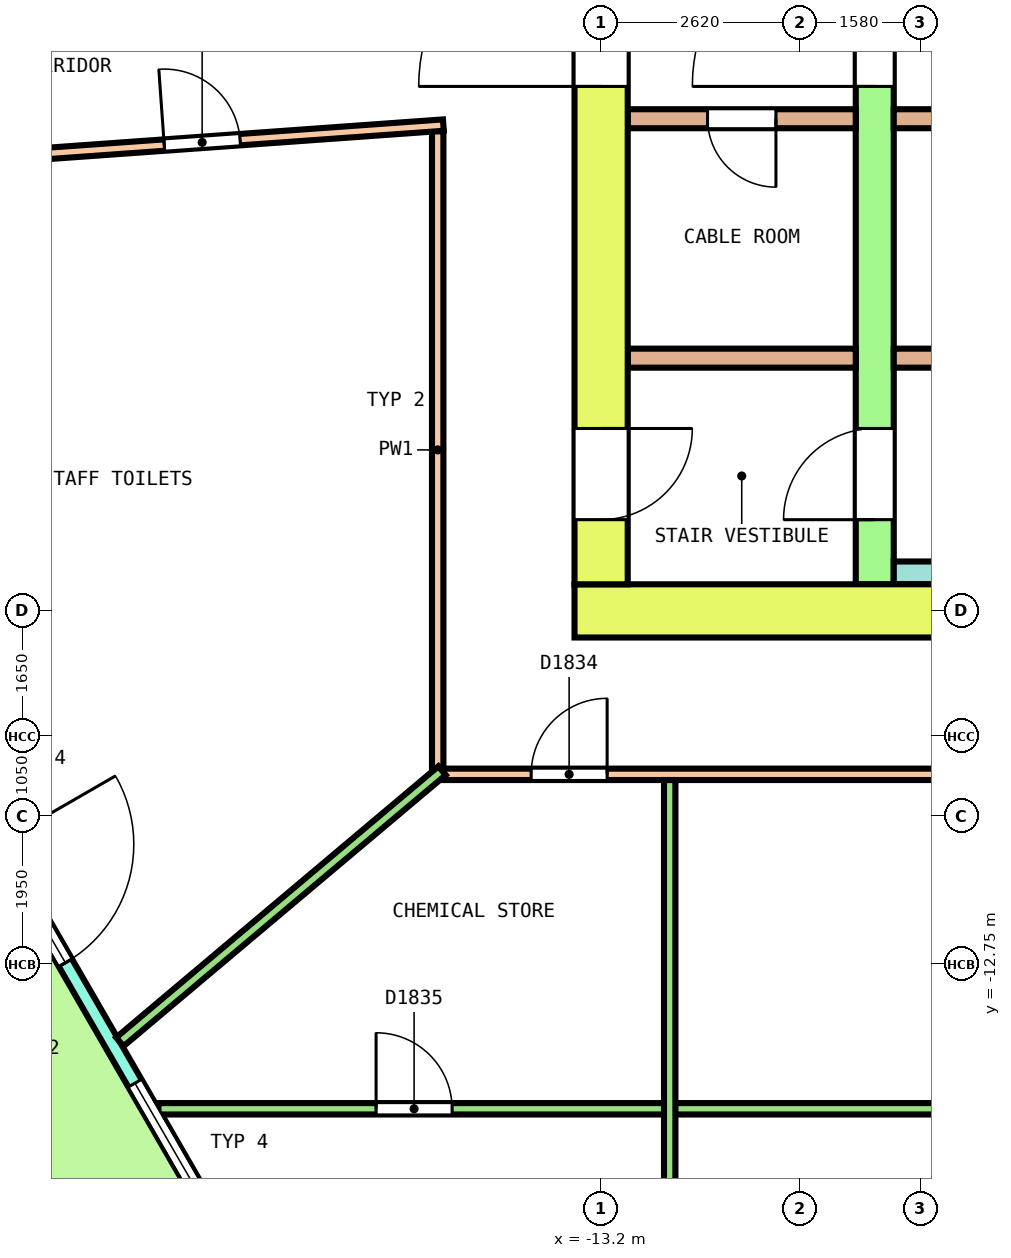
"""IFC4 building model, lengths in metres.
Left out: names, types, materials, properties, quantities, classifications, styles, units other than length and angle.
Written with IfcOpenShell. Run it as: python <this file> out.ifc"""

import sys

from ifc_helpers import new_model, si_unit, direction, frame, frame_2d, origin, place, context, subcontext, project, spatial, polyline, rectangle, outline, extrude, element, fill, save


model = new_model("IFC4")
c1 = context("Model", 3, precision=1e-05, world=origin(), true_north=direction((0.0, 1.0)))
c2 = subcontext(c1, "Body", "Model", "MODEL_VIEW")
j1 = project(units=[si_unit("LENGTHUNIT", "METRE"), si_unit("PLANEANGLEUNIT", "RADIAN")], contexts=[c1])
p1 = place(None, origin())
s1 = spatial("IfcSite", under=j1, at=p1, CompositionType="ELEMENT")
p2 = place(p1, origin())
s2 = spatial("IfcBuilding", under=s1, at=p2, CompositionType="ELEMENT")
p3 = place(p2, frame((0.0, 0.0, 176.0)))
s3 = spatial("IfcBuildingStorey", under=s2, at=p3, CompositionType="ELEMENT", Elevation=176.0)
p4 = place(p3, frame((-26.172, -2.469, 0.0), z_axis=(0.0, 0.0, 1.0), x_axis=(0.500000763912, -0.866024962739, 0.0)))
e1 = element("IfcWall", 1, at=p4, inside=s3, PredefinedType="SOLIDWALL", context=c2, shape_type="SweptSolid", body=[
    extrude(outline(polyline([(-0.027, -0.1), (1.018, -0.1), (2.063, -0.1), (3.109, -0.1), (4.154, -0.1), (5.199, -0.1), (6.244, -0.1), (7.289, -0.1), (8.334, -0.1), (9.38, -0.1), (10.425, -0.1), (11.47, -0.1), (12.515, -0.1), (13.56, -0.1), (14.605, -0.1), (15.65, -0.1), (16.696, -0.1), (17.741, -0.1), (18.786, -0.1), (19.831, -0.1), (20.876, -0.1), (21.921, -0.1), (21.868, 0.1), (20.828, 0.1), (19.788, 0.1), (18.748, 0.1), (17.708, 0.1), (16.667, 0.1), (15.627, 0.1), (14.587, 0.1), (13.547, 0.1), (12.507, 0.1), (11.467, 0.1), (10.427, 0.1), (9.387, 0.1), (8.347, 0.1), (7.307, 0.1), (6.267, 0.1), (5.227, 0.1), (4.187, 0.1), (3.147, 0.1), (2.107, 0.1), (1.067, 0.1), (0.027, 0.1), (-0.027, -0.1)])), origin(), (0.0, 0.0, 1.0), 4.1),
])
p5 = place(p4, frame((0.54, 0.0, 0.1)))
e2 = element("IfcOpeningElement", 2, at=p5, cuts=e1, PredefinedType="OPENING", context=c2, shape_type="SweptSolid", body=[
    extrude(rectangle(XDim=3.3, YDim=2.9, at=frame_2d((1.65, 1.45))), frame((0.0, 0.11, 0.0), z_axis=(0.0, -1.0, 0.0), x_axis=(1.0, 0.0, 0.0)), (0.0, 0.0, 1.0), 0.22),
])
p6 = place(p4, frame((4.918, 0.0, 0.1)))
e3 = element("IfcOpeningElement", 3, at=p6, cuts=e1, PredefinedType="OPENING", context=c2, shape_type="SweptSolid", body=[
    extrude(rectangle(XDim=3.3, YDim=2.9, at=frame_2d((1.65, 1.45))), frame((0.0, 0.11, 0.0), z_axis=(0.0, -1.0, 0.0), x_axis=(1.0, 0.0, 0.0)), (0.0, 0.0, 1.0), 0.22),
])
p7 = place(p4, frame((10.047, 0.0, 0.0)))
e4 = element("IfcOpeningElement", 4, at=p7, cuts=e1, PredefinedType="OPENING", context=c2, shape_type="SweptSolid", body=[
    extrude(rectangle(XDim=1.8, YDim=2.4, at=frame_2d((0.9, 1.2))), frame((0.0, 0.11, 0.0), z_axis=(0.0, -1.0, 0.0), x_axis=(1.0, 0.0, 0.0)), (0.0, 0.0, 1.0), 0.22),
])
p8 = place(p4, frame((10.047, 0.0, 2.55)))
e5 = element("IfcOpeningElement", 5, at=p8, cuts=e1, PredefinedType="OPENING", context=c2, shape_type="SweptSolid", body=[
    extrude(rectangle(XDim=1.8, YDim=0.45, at=frame_2d((0.9, 0.225))), frame((0.0, 0.11, 0.0), z_axis=(0.0, -1.0, 0.0), x_axis=(1.0, 0.0, 0.0)), (0.0, 0.0, 1.0), 0.22),
])
p9 = place(p4, frame((13.676, 0.0, 0.1)))
e6 = element("IfcOpeningElement", 6, at=p9, cuts=e1, PredefinedType="OPENING", context=c2, shape_type="SweptSolid", body=[
    extrude(rectangle(XDim=3.3, YDim=2.9, at=frame_2d((1.65, 1.45))), frame((0.0, 0.11, 0.0), z_axis=(0.0, -1.0, 0.0), x_axis=(1.0, 0.0, 0.0)), (0.0, 0.0, 1.0), 0.22),
])
p10 = place(p4, frame((18.055, 0.0, 0.1)))
e7 = element("IfcOpeningElement", 7, at=p10, cuts=e1, PredefinedType="OPENING", context=c2, shape_type="SweptSolid", body=[
    extrude(rectangle(XDim=3.3, YDim=2.9, at=frame_2d((1.65, 1.45))), frame((0.0, 0.11, 0.0), z_axis=(0.0, -1.0, 0.0), x_axis=(1.0, 0.0, 0.0)), (0.0, 0.0, 1.0), 0.22),
])
p11 = place(p3, frame((-13.55, -8.1, 0.0), z_axis=(0.0, 0.0, 1.0), x_axis=(1.0, 0.0, 0.0)))
e8 = element("IfcWall", 8, at=p11, inside=s3, PredefinedType="SHEAR", context=c2, shape_type="SweptSolid", body=[
    extrude(rectangle(XDim=27.1, YDim=0.7, at=frame_2d((13.55, 0.0))), origin(), (0.0, 0.0, 1.0), 4.1),
])
p12 = place(p11, frame((15.1, 0.0, 0.0)))
e9 = element("IfcOpeningElement", 9, at=p12, cuts=e8, PredefinedType="OPENING", context=c2, shape_type="SweptSolid", body=[
    extrude(rectangle(XDim=1.2, YDim=2.1, at=frame_2d((0.6, 1.05))), frame((0.0, 0.36, 0.0), z_axis=(0.0, -1.0, 0.0), x_axis=(1.0, 0.0, 0.0)), (0.0, 0.0, 1.0), 0.72),
])
p13 = place(p3, frame((-13.2, -7.75, 0.0), z_axis=(0.0, 0.0, 1.0), x_axis=(0.0, 1.0, 0.0)))
e10 = element("IfcWall", 10, at=p13, inside=s3, PredefinedType="SHEAR", context=c2, shape_type="SweptSolid", body=[
    extrude(rectangle(XDim=15.5, YDim=0.7, at=frame_2d((7.75, 0.0))), origin(), (0.0, 0.0, 1.0), 4.1),
])
p14 = place(p13, frame((6.55, 0.0, 0.0)))
e11 = element("IfcOpeningElement", 11, at=p14, cuts=e10, PredefinedType="OPENING", context=c2, shape_type="SweptSolid", body=[
    extrude(rectangle(XDim=2.4, YDim=2.1, at=frame_2d((1.2, 1.05))), frame((0.0, 0.36, 0.0), z_axis=(0.0, -1.0, 0.0), x_axis=(1.0, 0.0, 0.0)), (0.0, 0.0, 1.0), 0.72),
])
p15 = place(p13, frame((13.45, 0.0, 0.0)))
e12 = element("IfcOpeningElement", 12, at=p15, cuts=e10, PredefinedType="OPENING", context=c2, shape_type="SweptSolid", body=[
    extrude(rectangle(XDim=1.2, YDim=2.1, at=frame_2d((0.6, 1.05))), frame((0.0, 0.36, 0.0), z_axis=(0.0, -1.0, 0.0), x_axis=(1.0, 0.0, 0.0)), (0.0, 0.0, 1.0), 0.72),
])
p16 = place(p13, frame((0.85, 0.0, 0.0)))
e13 = element("IfcOpeningElement", 13, at=p16, cuts=e10, PredefinedType="OPENING", context=c2, shape_type="SweptSolid", body=[
    extrude(rectangle(XDim=1.2, YDim=2.1, at=frame_2d((0.6, 1.05))), frame((0.0, 0.36, 0.0), z_axis=(0.0, -1.0, 0.0), x_axis=(1.0, 0.0, 0.0)), (0.0, 0.0, 1.0), 0.72),
])
p17 = place(p3, frame((-9.6, -7.75, 0.0), z_axis=(0.0, 0.0, 1.0), x_axis=(0.0, 1.0, 0.0)))
e14 = element("IfcWall", 14, at=p17, inside=s3, PredefinedType="SHEAR", context=c2, shape_type="SweptSolid", body=[
    extrude(rectangle(XDim=15.5, YDim=0.5, at=frame_2d((7.75, 0.0))), origin(), (0.0, 0.0, 1.0), 4.1),
])
p18 = place(p17, frame((6.55, 0.0, 0.0)))
e15 = element("IfcOpeningElement", 15, at=p18, cuts=e14, PredefinedType="OPENING", context=c2, shape_type="SweptSolid", body=[
    extrude(rectangle(XDim=2.4, YDim=2.1, at=frame_2d((1.2, 1.05))), frame((0.0, 0.26, 0.0), z_axis=(0.0, -1.0, 0.0), x_axis=(1.0, 0.0, 0.0)), (0.0, 0.0, 1.0), 0.52),
])
p19 = place(p17, frame((13.45, 0.0, 0.0)))
e16 = element("IfcOpeningElement", 16, at=p19, cuts=e14, PredefinedType="OPENING", context=c2, shape_type="SweptSolid", body=[
    extrude(rectangle(XDim=1.2, YDim=2.1, at=frame_2d((0.6, 1.05))), frame((0.0, 0.26, 0.0), z_axis=(0.0, -1.0, 0.0), x_axis=(1.0, 0.0, 0.0)), (0.0, 0.0, 1.0), 0.52),
])
p20 = place(p17, frame((0.85, 0.0, 0.0)))
e17 = element("IfcOpeningElement", 17, at=p20, cuts=e14, PredefinedType="OPENING", context=c2, shape_type="SweptSolid", body=[
    extrude(rectangle(XDim=1.2, YDim=2.1, at=frame_2d((0.6, 1.05))), frame((0.0, 0.26, 0.0), z_axis=(0.0, -1.0, 0.0), x_axis=(1.0, 0.0, 0.0)), (0.0, 0.0, 1.0), 0.52),
])
p21 = place(p3, frame((-12.85, -1.625, 0.0), z_axis=(0.0, 0.0, 1.0), x_axis=(1.0, 0.0, 0.0)))
e18 = element("IfcWall", 18, at=p21, inside=s3, PredefinedType="SOLIDWALL", context=c2, shape_type="SweptSolid", body=[
    extrude(rectangle(XDim=3.0, YDim=0.25, at=frame_2d((1.5, 0.0))), origin(), (0.0, 0.0, 1.0), 4.1),
])
p22 = place(p21, frame((1.05, 0.0, 0.0)))
e19 = element("IfcOpeningElement", 19, at=p22, cuts=e18, PredefinedType="OPENING", context=c2, shape_type="SweptSolid", body=[
    extrude(rectangle(XDim=0.9, YDim=2.1, at=frame_2d((0.45, 1.05))), frame((0.0, 0.135, 0.0), z_axis=(0.0, -1.0, 0.0), x_axis=(1.0, 0.0, 0.0)), (0.0, 0.0, 1.0), 0.27),
])
p23 = place(p3, frame((-9.35, -1.625, 0.0), z_axis=(0.0, 0.0, 1.0), x_axis=(1.0, 0.0, 0.0)))
e20 = element("IfcWall", 20, at=p23, inside=s3, PredefinedType="SOLIDWALL", context=c2, shape_type="SweptSolid", body=[
    extrude(rectangle(XDim=18.7, YDim=0.25, at=frame_2d((9.35, 0.0))), origin(), (0.0, 0.0, 1.0), 4.1),
])
p24 = place(p23, frame((2.85, 0.0, 0.0)))
e21 = element("IfcOpeningElement", 21, at=p24, cuts=e20, PredefinedType="OPENING", context=c2, shape_type="SweptSolid", body=[
    extrude(rectangle(XDim=1.1, YDim=2.1, at=frame_2d((0.55, 1.05))), frame((0.0, 0.135, 0.0), z_axis=(0.0, -1.0, 0.0), x_axis=(1.0, 0.0, 0.0)), (0.0, 0.0, 1.0), 0.27),
])
p25 = place(p23, frame((5.15, 0.0, 0.0)))
e22 = element("IfcOpeningElement", 22, at=p25, cuts=e20, PredefinedType="OPENING", context=c2, shape_type="SweptSolid", body=[
    extrude(rectangle(XDim=1.1, YDim=2.1, at=frame_2d((0.55, 1.05))), frame((0.0, 0.135, 0.0), z_axis=(0.0, -1.0, 0.0), x_axis=(1.0, 0.0, 0.0)), (0.0, 0.0, 1.0), 0.27),
])
p26 = place(p23, frame((14.8, 0.0, 0.0)))
e23 = element("IfcOpeningElement", 23, at=p26, cuts=e20, PredefinedType="OPENING", context=c2, shape_type="SweptSolid", body=[
    extrude(rectangle(XDim=1.1, YDim=2.1, at=frame_2d((0.55, 1.05))), frame((0.0, 0.135, 0.0), z_axis=(0.0, -1.0, 0.0), x_axis=(1.0, 0.0, 0.0)), (0.0, 0.0, 1.0), 0.27),
])
p27 = place(p23, frame((0.575, 0.0, 0.0)))
e24 = element("IfcOpeningElement", 24, at=p27, cuts=e20, PredefinedType="OPENING", context=c2, shape_type="SweptSolid", body=[
    extrude(rectangle(XDim=0.9, YDim=2.1, at=frame_2d((0.45, 1.05))), frame((0.0, 0.135, 0.0), z_axis=(0.0, -1.0, 0.0), x_axis=(1.0, 0.0, 0.0)), (0.0, 0.0, 1.0), 0.27),
])
p28 = place(p23, frame((17.225, 0.0, 0.0)))
e25 = element("IfcOpeningElement", 25, at=p28, cuts=e20, PredefinedType="OPENING", context=c2, shape_type="SweptSolid", body=[
    extrude(rectangle(XDim=0.9, YDim=2.1, at=frame_2d((0.45, 1.05))), frame((0.0, 0.135, 0.0), z_axis=(0.0, -1.0, 0.0), x_axis=(1.0, 0.0, 0.0)), (0.0, 0.0, 1.0), 0.27),
])
p29 = place(p3, frame((-12.85, -4.775, 0.0), z_axis=(0.0, 0.0, 1.0), x_axis=(1.0, 0.0, 0.0)))
e26 = element("IfcWall", 26, at=p29, inside=s3, PredefinedType="SOLIDWALL", context=c2, shape_type="SweptSolid", body=[
    extrude(rectangle(XDim=3.0, YDim=0.25, at=frame_2d((1.5, 0.0))), origin(), (0.0, 0.0, 1.0), 4.1),
])
p30 = place(p3, frame((-9.35, -4.775, 0.0), z_axis=(0.0, 0.0, 1.0), x_axis=(1.0, 0.0, 0.0)))
e27 = element("IfcWall", 27, at=p30, inside=s3, PredefinedType="SOLIDWALL", context=c2, shape_type="SweptSolid", body=[
    extrude(rectangle(XDim=18.7, YDim=0.25, at=frame_2d((9.35, 0.0))), origin(), (0.0, 0.0, 1.0), 4.1),
])
p31 = place(p3, frame((-9.35, -7.6, 0.0), z_axis=(0.0, 0.0, 1.0), x_axis=(1.0, 0.0, 0.0)))
e28 = element("IfcWall", 28, at=p31, inside=s3, PredefinedType="SOLIDWALL", context=c2, shape_type="SweptSolid", body=[
    extrude(rectangle(XDim=5.8, YDim=0.3, at=frame_2d((2.9, 0.0))), origin(), (0.0, 0.0, 1.0), 4.1),
])
p32 = place(p3, frame((-15.35, -10.175, 0.0), z_axis=(0.0, 0.0, 1.0), x_axis=(0.0, 1.0, 0.0)))
e29 = element("IfcWall", 29, at=p32, inside=s3, PredefinedType="PARTITIONING", context=c2, shape_type="SweptSolid", body=[
    extrude(rectangle(XDim=8.386, YDim=0.15, at=frame_2d((4.193, 0.0))), origin(), (0.0, 0.0, 1.0), 3.05),
])
p33 = place(p3, frame((-15.275, -10.25, 0.0), z_axis=(0.0, 0.0, 1.0), x_axis=(1.0, 0.0, 0.0)))
e30 = element("IfcWall", 30, at=p33, inside=s3, PredefinedType="PARTITIONING", context=c2, shape_type="SweptSolid", body=[
    extrude(rectangle(XDim=30.575, YDim=0.15, at=frame_2d((15.288, 0.0))), origin(), (0.0, 0.0, 1.0), 3.05),
])
p34 = place(p33, frame((1.154, 0.0, 0.0)))
e31 = element("IfcOpeningElement", 31, at=p34, cuts=e30, PredefinedType="OPENING", context=c2, shape_type="SweptSolid", body=[
    extrude(rectangle(XDim=1.0, YDim=2.1, at=frame_2d((0.5, 1.05))), frame((0.0, 0.085, 0.0), z_axis=(0.0, -1.0, 0.0), x_axis=(1.0, 0.0, 0.0)), (0.0, 0.0, 1.0), 0.17),
])
p35 = place(p33, frame((13.712, 0.0, 0.0)))
e32 = element("IfcOpeningElement", 32, at=p35, cuts=e30, PredefinedType="OPENING", context=c2, shape_type="SweptSolid", body=[
    extrude(rectangle(XDim=1.2, YDim=2.1, at=frame_2d((0.6, 1.05))), frame((0.0, 0.085, 0.0), z_axis=(0.0, -1.0, 0.0), x_axis=(1.0, 0.0, 0.0)), (0.0, 0.0, 1.0), 0.17),
])
p36 = place(p33, frame((22.516, 0.0, 0.0)))
e33 = element("IfcOpeningElement", 33, at=p36, cuts=e30, PredefinedType="OPENING", context=c2, shape_type="SweptSolid", body=[
    extrude(rectangle(XDim=1.0, YDim=2.1, at=frame_2d((0.5, 1.05))), frame((0.0, 0.085, 0.0), z_axis=(0.0, -1.0, 0.0), x_axis=(1.0, 0.0, 0.0)), (0.0, 0.0, 1.0), 0.17),
])
p37 = place(p33, frame((28.187, 0.0, 0.0)))
e34 = element("IfcOpeningElement", 34, at=p37, cuts=e30, PredefinedType="OPENING", context=c2, shape_type="SweptSolid", body=[
    extrude(rectangle(XDim=1.0, YDim=2.1, at=frame_2d((0.5, 1.05))), frame((0.0, 0.085, 0.0), z_axis=(0.0, -1.0, 0.0), x_axis=(1.0, 0.0, 0.0)), (0.0, 0.0, 1.0), 0.17),
])
p38 = place(p3, frame((-26.05, -2.48, 0.0), z_axis=(0.0, 0.0, 1.0), x_axis=(0.997446409399, 0.071418907704, 0.0)))
e35 = element("IfcWall", 35, at=p38, inside=s3, PredefinedType="PARTITIONING", context=c2, shape_type="SweptSolid", body=[
    extrude(rectangle(XDim=10.802, YDim=0.15, at=frame_2d((5.401, 0.0))), origin(), (0.0, 0.0, 1.0), 3.05),
])
p39 = place(p38, frame((7.121, 0.0, 0.0)))
e36 = element("IfcOpeningElement", 36, at=p39, cuts=e35, PredefinedType="OPENING", context=c2, shape_type="SweptSolid", body=[
    extrude(rectangle(XDim=1.0, YDim=2.1, at=frame_2d((0.5, 1.05))), frame((0.0, 0.085, 0.0), z_axis=(0.0, -1.0, 0.0), x_axis=(1.0, 0.0, 0.0)), (0.0, 0.0, 1.0), 0.17),
])
p40 = place(p3, frame((-19.532, -13.77, 0.0), z_axis=(0.0, 0.0, 1.0), x_axis=(0.765048286371, 0.643972918313, 0.0)))
e37 = element("IfcWall", 37, at=p40, inside=s3, PredefinedType="PARTITIONING", context=c2, shape_type="SweptSolid", body=[
    extrude(rectangle(XDim=5.541, YDim=0.15, at=frame_2d((2.771, 0.0))), origin(), (0.0, 0.0, 1.0), 3.05),
])
p41 = place(p3, frame((-19.024, -14.65, 0.0), z_axis=(0.0, 0.0, 1.0), x_axis=(1.0, 0.0, 0.0)))
e38 = element("IfcWall", 38, at=p41, inside=s3, PredefinedType="PARTITIONING", context=c2, shape_type="SweptSolid", body=[
    extrude(rectangle(XDim=24.527, YDim=0.15, at=frame_2d((12.264, 0.0))), origin(), (0.0, 0.0, 1.0), 3.05),
])
p42 = place(p41, frame((2.863, 0.0, 0.0)))
e39 = element("IfcOpeningElement", 39, at=p42, cuts=e38, PredefinedType="OPENING", context=c2, shape_type="SweptSolid", body=[
    extrude(rectangle(XDim=1.0, YDim=2.1, at=frame_2d((0.5, 1.05))), frame((0.0, 0.085, 0.0), z_axis=(0.0, -1.0, 0.0), x_axis=(1.0, 0.0, 0.0)), (0.0, 0.0, 1.0), 0.17),
])
p43 = place(p41, frame((11.07, 0.0, 0.0)))
e40 = element("IfcOpeningElement", 40, at=p43, cuts=e38, PredefinedType="OPENING", context=c2, shape_type="SweptSolid", body=[
    extrude(rectangle(XDim=1.2, YDim=2.1, at=frame_2d((0.6, 1.05))), frame((0.0, 0.085, 0.0), z_axis=(0.0, -1.0, 0.0), x_axis=(1.0, 0.0, 0.0)), (0.0, 0.0, 1.0), 0.17),
])
p44 = place(p3, frame((-12.298, -23.005, 0.0), z_axis=(0.0, 0.0, 1.0), x_axis=(0.0, 1.0, 0.0)))
e41 = element("IfcWall", 41, at=p44, inside=s3, PredefinedType="PARTITIONING", context=c2, shape_type="SweptSolid", body=[
    extrude(rectangle(XDim=12.68, YDim=0.15, at=frame_2d((6.34, 0.0))), origin(), (0.0, 0.0, 1.0), 3.05),
])
p45 = place(p7, origin())
e42 = element("IfcDoor", 42, at=p45, inside=s3, OperationType="DOUBLE_DOOR_SINGLE_SWING", PredefinedType="DOOR", context=c2, shape_type="SweptSolid", body=[
    extrude(rectangle(XDim=1.8, YDim=2.4, at=frame_2d((0.9, 1.2))), frame((0.0, 0.025, 0.0), z_axis=(0.0, -1.0, 0.0), x_axis=(1.0, 0.0, 0.0)), (0.0, 0.0, 1.0), 0.05),
])
fill(e4, e42)
p46 = place(p8, origin())
e43 = element("IfcWindow", 43, at=p46, inside=s3, PartitioningType="SINGLE_PANEL", PredefinedType="WINDOW", context=c2, shape_type="SweptSolid", body=[
    extrude(rectangle(XDim=1.8, YDim=0.45, at=frame_2d((0.9, 0.225))), frame((0.0, 0.03, 0.0), z_axis=(0.0, -1.0, 0.0), x_axis=(1.0, 0.0, 0.0)), (0.0, 0.0, 1.0), 0.06),
])
fill(e5, e43)
p47 = place(p9, origin())
e44 = element("IfcWindow", 44, at=p47, inside=s3, PartitioningType="SINGLE_PANEL", PredefinedType="WINDOW", context=c2, shape_type="SweptSolid", body=[
    extrude(rectangle(XDim=3.3, YDim=2.9, at=frame_2d((1.65, 1.45))), frame((0.0, 0.03, 0.0), z_axis=(0.0, -1.0, 0.0), x_axis=(1.0, 0.0, 0.0)), (0.0, 0.0, 1.0), 0.06),
])
fill(e6, e44)
p48 = place(p18, origin())
e45 = element("IfcDoor", 45, at=p48, inside=s3, OperationType="DOUBLE_DOOR_SINGLE_SWING", PredefinedType="DOOR", context=c2, shape_type="SweptSolid", body=[
    extrude(rectangle(XDim=2.4, YDim=2.1, at=frame_2d((1.2, 1.05))), frame((0.0, 0.2, 0.0), z_axis=(0.0, -1.0, 0.0), x_axis=(1.0, 0.0, 0.0)), (0.0, 0.0, 1.0), 0.4),
])
fill(e15, e45)
p49 = place(p14, origin())
e46 = element("IfcDoor", 46, at=p49, inside=s3, OperationType="DOUBLE_DOOR_SINGLE_SWING", PredefinedType="DOOR", context=c2, shape_type="SweptSolid", body=[
    extrude(rectangle(XDim=2.4, YDim=2.1, at=frame_2d((1.2, 1.05))), frame((0.0, 0.3, 0.0), z_axis=(0.0, -1.0, 0.0), x_axis=(1.0, 0.0, 0.0)), (0.0, 0.0, 1.0), 0.6),
])
fill(e11, e46)
p50 = place(p20, origin())
e47 = element("IfcDoor", 47, at=p50, inside=s3, OperationType="SINGLE_SWING_LEFT", PredefinedType="DOOR", context=c2, shape_type="SweptSolid", body=[
    extrude(rectangle(XDim=1.2, YDim=2.1, at=frame_2d((0.6, 1.05))), frame((0.0, 0.2, 0.0), z_axis=(0.0, -1.0, 0.0), x_axis=(1.0, 0.0, 0.0)), (0.0, 0.0, 1.0), 0.4),
])
fill(e17, e47)
p51 = place(p16, origin())
e48 = element("IfcDoor", 48, at=p51, inside=s3, OperationType="SINGLE_SWING_RIGHT", PredefinedType="DOOR", context=c2, shape_type="SweptSolid", body=[
    extrude(rectangle(XDim=1.2, YDim=2.1, at=frame_2d((0.6, 1.05))), frame((0.0, 0.3, 0.0), z_axis=(0.0, -1.0, 0.0), x_axis=(1.0, 0.0, 0.0)), (0.0, 0.0, 1.0), 0.6),
])
fill(e13, e48)
p52 = place(p22, origin())
e49 = element("IfcDoor", 49, at=p52, inside=s3, OperationType="SINGLE_SWING_LEFT", PredefinedType="DOOR", context=c2, shape_type="SweptSolid", body=[
    extrude(rectangle(XDim=0.9, YDim=2.1, at=frame_2d((0.45, 1.05))), frame((0.0, 0.075, 0.0), z_axis=(0.0, -1.0, 0.0), x_axis=(1.0, 0.0, 0.0)), (0.0, 0.0, 1.0), 0.15),
])
fill(e19, e49)
p53 = place(p39, origin())
e50 = element("IfcDoor", 50, at=p53, inside=s3, OperationType="SINGLE_SWING_LEFT", PredefinedType="DOOR", context=c2, shape_type="SweptSolid", body=[
    extrude(rectangle(XDim=1.0, YDim=2.1, at=frame_2d((0.5, 1.05))), frame((0.0, 0.025, 0.0), z_axis=(0.0, -1.0, 0.0), x_axis=(1.0, 0.0, 0.0)), (0.0, 0.0, 1.0), 0.05),
])
fill(e36, e50)
p54 = place(p34, origin())
e51 = element("IfcDoor", 51, at=p54, inside=s3, OperationType="SINGLE_SWING_LEFT", PredefinedType="DOOR", context=c2, shape_type="SweptSolid", body=[
    extrude(rectangle(XDim=1.0, YDim=2.1, at=frame_2d((0.5, 1.05))), frame((0.0, 0.025, 0.0), z_axis=(0.0, -1.0, 0.0), x_axis=(1.0, 0.0, 0.0)), (0.0, 0.0, 1.0), 0.05),
])
fill(e31, e51)
p55 = place(p42, origin())
e52 = element("IfcDoor", 52, at=p55, inside=s3, OperationType="SINGLE_SWING_RIGHT", PredefinedType="DOOR", context=c2, shape_type="SweptSolid", body=[
    extrude(rectangle(XDim=1.0, YDim=2.1, at=frame_2d((0.5, 1.05))), frame((0.0, 0.025, 0.0), z_axis=(0.0, -1.0, 0.0), x_axis=(1.0, 0.0, 0.0)), (0.0, 0.0, 1.0), 0.05),
])
fill(e39, e52)
save(model, sys.argv[1])
